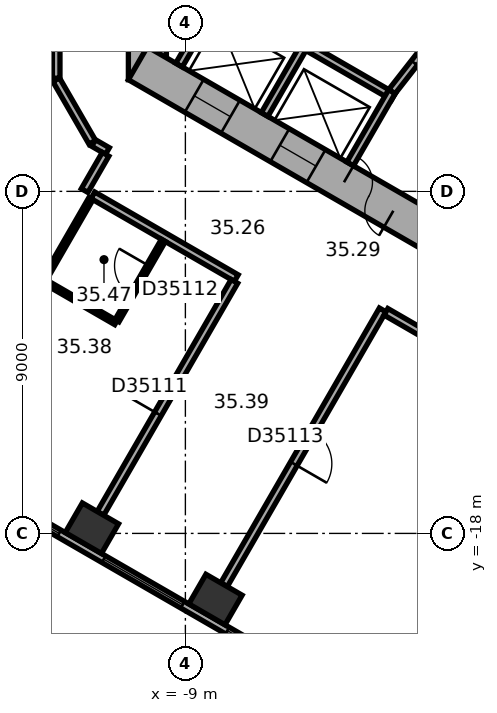
"""IFC4 building model, lengths in metres.
Left out: names, types, materials, properties, quantities, classifications, styles, units other than length and angle.
Written with IfcOpenShell. Run it as: python <this file> out.ifc"""

import sys

from ifc_helpers import new_model, si_unit, direction, frame, frame_2d, origin, origin_2d, place, context, subcontext, project, spatial, rectangle, extrude, element, fill, save


model = new_model("IFC4")
c1 = context("Model", 3, precision=1e-05, world=origin(), true_north=direction((0.0, 1.0)))
c2 = subcontext(c1, "Body", "Model", "MODEL_VIEW")
j1 = project(units=[si_unit("LENGTHUNIT", "METRE"), si_unit("PLANEANGLEUNIT", "RADIAN")], contexts=[c1])
p1 = place(None, origin())
s1 = spatial("IfcSite", under=j1, at=p1, CompositionType="ELEMENT")
p2 = place(p1, origin())
s2 = spatial("IfcBuilding", under=s1, at=p2, CompositionType="ELEMENT")
p3 = place(p2, frame((0.0, 0.0, 146.6)))
s3 = spatial("IfcBuildingStorey", under=s2, at=p3, CompositionType="ELEMENT", Elevation=146.6)
for number, where, z_axis, x_axis in (
    (1, (-11.46, -17.863, 0.0), (0.0, 0.0, 1.0), (0.866, -0.5, 0.0)),
    (2, (-8.208, -19.74, 0.0), (0.0, 0.0, 1.0), (0.866, -0.5, 0.0)),
):
    element("IfcColumn", number, at=place(p3, frame(where, z_axis=z_axis, x_axis=x_axis)), inside=s3, PredefinedType="COLUMN", context=c2, shape_type="SweptSolid", body=[
        extrude(rectangle(XDim=1.1, YDim=0.9, at=origin_2d()), origin(), (0.0, 0.0, 1.0), 3.7),
    ])
p4 = place(p3, frame((-10.0, 6.062, 0.0), z_axis=(0.0, 0.0, 1.0), x_axis=(0.0, -1.0, 0.0)))
e3 = element("IfcWall", 3, at=p4, inside=s3, PredefinedType="SHEAR", context=c2, shape_type="SweptSolid", body=[
    extrude(rectangle(XDim=12.125, YDim=1.0, at=frame_2d((6.062, 0.0))), origin(), (0.0, 0.0, 1.0), 3.7),
])
p5 = place(p4, frame((5.212, 0.0, 0.0)))
e4 = element("IfcOpeningElement", 4, at=p5, cuts=e3, PredefinedType="OPENING", context=c2, shape_type="SweptSolid", body=[
    extrude(rectangle(XDim=1.1, YDim=2.1, at=frame_2d((0.55, 1.05))), frame((0.0, 0.51, 0.0), z_axis=(0.0, -1.0, 0.0), x_axis=(1.0, 0.0, 0.0)), (0.0, 0.0, 1.0), 1.02),
])
p6 = place(p4, frame((7.812, 0.0, 0.0)))
e5 = element("IfcOpeningElement", 5, at=p6, cuts=e3, PredefinedType="OPENING", context=c2, shape_type="SweptSolid", body=[
    extrude(rectangle(XDim=1.1, YDim=2.1, at=frame_2d((0.55, 1.05))), frame((0.0, 0.51, 0.0), z_axis=(0.0, -1.0, 0.0), x_axis=(1.0, 0.0, 0.0)), (0.0, 0.0, 1.0), 1.02),
])
p7 = place(p3, frame((-10.25, -5.629, 0.0), z_axis=(0.0, 0.0, 1.0), x_axis=(0.866022616891, -0.50000482701, 0.0)))
e6 = element("IfcWall", 6, at=p7, inside=s3, PredefinedType="SHEAR", context=c2, shape_type="SweptSolid", body=[
    extrude(rectangle(XDim=12.125, YDim=1.0, at=frame_2d((6.062, 0.0))), origin(), (0.0, 0.0, 1.0), 3.7),
])
p8 = place(p7, frame((6.262, 0.0, 0.0)))
e7 = element("IfcOpeningElement", 7, at=p8, cuts=e6, PredefinedType="OPENING", context=c2, shape_type="SweptSolid", body=[
    extrude(rectangle(XDim=1.5, YDim=2.1, at=frame_2d((0.75, 1.05))), frame((0.0, 0.51, 0.0), z_axis=(0.0, -1.0, 0.0), x_axis=(1.0, 0.0, 0.0)), (0.0, 0.0, 1.0), 1.02),
])
p9 = place(p7, frame((1.712, 0.0, 0.0)))
e8 = element("IfcOpeningElement", 8, at=p9, cuts=e6, PredefinedType="OPENING", context=c2, shape_type="SweptSolid", body=[
    extrude(rectangle(XDim=1.1, YDim=2.1, at=frame_2d((0.55, 1.05))), frame((0.0, 0.51, 0.0), z_axis=(0.0, -1.0, 0.0), x_axis=(1.0, 0.0, 0.0)), (0.0, 0.0, 1.0), 1.02),
])
p10 = place(p7, frame((4.312, 0.0, 0.0)))
e9 = element("IfcOpeningElement", 9, at=p10, cuts=e6, PredefinedType="OPENING", context=c2, shape_type="SweptSolid", body=[
    extrude(rectangle(XDim=1.1, YDim=2.1, at=frame_2d((0.55, 1.05))), frame((0.0, 0.51, 0.0), z_axis=(0.0, -1.0, 0.0), x_axis=(1.0, 0.0, 0.0)), (0.0, 0.0, 1.0), 1.02),
])
p11 = place(p3, frame((-18.789, -14.267, 0.0), z_axis=(0.0, 0.0, 1.0), x_axis=(0.866023315909, -0.500003616288, 0.0)))
e10 = element("IfcWall", 10, at=p11, inside=s3, PredefinedType="STANDARD", context=c2, shape_type="SweptSolid", body=[
    extrude(rectangle(XDim=20.044, YDim=0.2, at=frame_2d((10.022, 0.0))), origin(), (0.0, 0.0, 1.0), 3.7),
])
p12 = place(p11, frame((1.314, 0.0, 0.9)))
e11 = element("IfcOpeningElement", 11, at=p12, cuts=e10, PredefinedType="OPENING", context=c2, shape_type="SweptSolid", body=[
    extrude(rectangle(XDim=2.4, YDim=2.0, at=frame_2d((1.2, 1.0))), frame((0.0, 0.11, 0.0), z_axis=(0.0, -1.0, 0.0), x_axis=(1.0, 0.0, 0.0)), (0.0, 0.0, 1.0), 0.22),
])
p13 = place(p11, frame((5.069, 0.0, 0.9)))
e12 = element("IfcOpeningElement", 12, at=p13, cuts=e10, PredefinedType="OPENING", context=c2, shape_type="SweptSolid", body=[
    extrude(rectangle(XDim=2.4, YDim=2.0, at=frame_2d((1.2, 1.0))), frame((0.0, 0.11, 0.0), z_axis=(0.0, -1.0, 0.0), x_axis=(1.0, 0.0, 0.0)), (0.0, 0.0, 1.0), 0.22),
])
p14 = place(p11, frame((8.823, 0.0, 0.9)))
e13 = element("IfcOpeningElement", 13, at=p14, cuts=e10, PredefinedType="OPENING", context=c2, shape_type="SweptSolid", body=[
    extrude(rectangle(XDim=2.4, YDim=2.0, at=frame_2d((1.2, 1.0))), frame((0.0, 0.11, 0.0), z_axis=(0.0, -1.0, 0.0), x_axis=(1.0, 0.0, 0.0)), (0.0, 0.0, 1.0), 0.22),
])
p15 = place(p11, frame((12.577, 0.0, 0.9)))
e14 = element("IfcOpeningElement", 14, at=p15, cuts=e10, PredefinedType="OPENING", context=c2, shape_type="SweptSolid", body=[
    extrude(rectangle(XDim=2.4, YDim=2.0, at=frame_2d((1.2, 1.0))), frame((0.0, 0.11, 0.0), z_axis=(0.0, -1.0, 0.0), x_axis=(1.0, 0.0, 0.0)), (0.0, 0.0, 1.0), 0.22),
])
p16 = place(p11, frame((16.331, 0.0, 0.9)))
e15 = element("IfcOpeningElement", 15, at=p16, cuts=e10, PredefinedType="OPENING", context=c2, shape_type="SweptSolid", body=[
    extrude(rectangle(XDim=2.4, YDim=2.0, at=frame_2d((1.2, 1.0))), frame((0.0, 0.11, 0.0), z_axis=(0.0, -1.0, 0.0), x_axis=(1.0, 0.0, 0.0)), (0.0, 0.0, 1.0), 0.22),
])
p17 = place(p3, frame((-8.203, -3.809, 0.0), z_axis=(0.0, 0.0, 1.0), x_axis=(0.866028230842, -0.499995103361, 0.0)))
e16 = element("IfcWall", 16, at=p17, inside=s3, PredefinedType="PARTITIONING", context=c2, shape_type="SweptSolid", body=[
    extrude(rectangle(XDim=5.4, YDim=0.2, at=frame_2d((2.7, 0.0))), origin(), (0.0, 0.0, 1.0), 3.42),
])
for number, where, z_axis, x_axis in (
    (17, (-8.067, -3.772, 0.0), (0.0, 0.0, 1.0), (-0.5, -0.866, 0.0)),
    (18, (-5.815, -5.072, 0.0), (0.0, 0.0, 1.0), (-0.5, -0.866, 0.0)),
):
    element("IfcWall", number, at=place(p3, frame(where, z_axis=z_axis, x_axis=x_axis)), inside=s3, PredefinedType="PARTITIONING", context=c2, shape_type="SweptSolid", body=[
        extrude(rectangle(XDim=2.2, YDim=0.2, at=frame_2d((1.1, 0.0))), origin(), (0.0, 0.0, 1.0), 3.42),
    ])
p18 = place(p3, frame((-3.563, -6.372, 0.0), z_axis=(0.0, 0.0, 1.0), x_axis=(-0.499994660107, -0.866028486751, 0.0)))
e19 = element("IfcWall", 19, at=p18, inside=s3, PredefinedType="PARTITIONING", context=c2, shape_type="SweptSolid", body=[
    extrude(rectangle(XDim=2.2, YDim=0.2, at=frame_2d((1.1, 0.0))), origin(), (0.0, 0.0, 1.0), 3.42),
])
p19 = place(p3, frame((-1.712, -4.008, 0.0), z_axis=(0.0, 0.0, 1.0), x_axis=(-0.616549420702, -0.787316208287, 0.0)))
e20 = element("IfcWall", 20, at=p19, inside=s3, PredefinedType="PARTITIONING", context=c2, shape_type="SweptSolid", body=[
    extrude(rectangle(XDim=3.002, YDim=0.2, at=frame_2d((1.501, 0.0))), origin(), (0.0, 0.0, 1.0), 3.42),
])
p20 = place(p19, frame((1.15, 0.0, 0.0)))
e21 = element("IfcOpeningElement", 21, at=p20, cuts=e20, PredefinedType="OPENING", context=c2, shape_type="SweptSolid", body=[
    extrude(rectangle(XDim=0.9, YDim=2.1, at=frame_2d((0.45, 1.05))), frame((0.0, 0.11, 0.0), z_axis=(0.0, -1.0, 0.0), x_axis=(1.0, 0.0, 0.0)), (0.0, 0.0, 1.0), 0.22),
])
p21 = place(p3, frame((-20.421, -6.005, 0.0), z_axis=(0.0, 0.0, 1.0), x_axis=(0.998134865741, 0.061047438866, 0.0)))
e22 = element("IfcWall", 22, at=p21, inside=s3, PredefinedType="PARTITIONING", context=c2, shape_type="SweptSolid", body=[
    extrude(rectangle(XDim=7.927, YDim=0.2, at=frame_2d((3.963, 0.0))), origin(), (0.0, 0.0, 1.0), 2.87),
])
p22 = place(p3, frame((-12.735, -11.355, 0.0), z_axis=(0.0, 0.0, 1.0), x_axis=(0.500004234368, 0.866022959057, 0.0)))
e23 = element("IfcWall", 23, at=p22, inside=s3, PredefinedType="PARTITIONING", context=c2, shape_type="SweptSolid", body=[
    extrude(rectangle(XDim=2.5, YDim=0.12, at=frame_2d((1.25, 0.0))), origin(), (0.0, 0.0, 1.0), 3.42),
])
p23 = place(p3, frame((-12.4, -6.062, 0.0), z_axis=(0.0, 0.0, 1.0), x_axis=(0.500022797313, -0.86601224135, 0.0)))
e24 = element("IfcWall", 24, at=p23, inside=s3, PredefinedType="PARTITIONING", context=c2, shape_type="SweptSolid", body=[
    extrude(rectangle(XDim=1.9, YDim=0.2, at=frame_2d((0.95, 0.0))), origin(), (0.0, 0.0, 1.0), 3.42),
])
p24 = place(p3, frame((-12.4, -4.201, 0.0), z_axis=(0.0, 0.0, 1.0), x_axis=(0.0, -1.0, 0.0)))
e25 = element("IfcWall", 25, at=p24, inside=s3, PredefinedType="PARTITIONING", context=c2, shape_type="SweptSolid", body=[
    extrude(rectangle(XDim=1.821, YDim=0.2, at=frame_2d((0.911, 0.0))), origin(), (0.0, 0.0, 1.0), 3.42),
])
p25 = place(p3, frame((-11.435, -9.103, 0.0), z_axis=(0.0, 0.0, 1.0), x_axis=(0.866007399799, -0.500031182522, 0.0)))
e26 = element("IfcWall", 26, at=p25, inside=s3, PredefinedType="PARTITIONING", context=c2, shape_type="SweptSolid", body=[
    extrude(rectangle(XDim=4.358, YDim=0.2, at=frame_2d((2.179, 0.0))), origin(), (0.0, 0.0, 1.0), 3.42),
])
p26 = place(p3, frame((-11.415, -7.728, 0.0), z_axis=(0.0, 0.0, 1.0), x_axis=(0.865915281873, -0.500190688257, 0.0)))
e27 = element("IfcWall", 27, at=p26, inside=s3, PredefinedType="PARTITIONING", context=c2, shape_type="SweptSolid", body=[
    extrude(rectangle(XDim=0.421, YDim=0.2, at=frame_2d((0.21, 0.0))), origin(), (0.0, 0.0, 1.0), 3.42),
])
p27 = place(p3, frame((-11.235, -17.474, 0.0), z_axis=(0.0, 0.0, 1.0), x_axis=(0.500009260695, 0.866020057054, 0.0)))
e28 = element("IfcWall", 28, at=p27, inside=s3, PredefinedType="PARTITIONING", context=c2, shape_type="SweptSolid", body=[
    extrude(rectangle(XDim=7.049, YDim=0.2, at=frame_2d((3.524, 0.0))), origin(), (0.0, 0.0, 1.0), 2.87),
])
p28 = place(p27, frame((3.024, 0.0, 0.0)))
e29 = element("IfcOpeningElement", 29, at=p28, cuts=e28, PredefinedType="OPENING", context=c2, shape_type="SweptSolid", body=[
    extrude(rectangle(XDim=1.0, YDim=2.1, at=frame_2d((0.5, 1.05))), frame((0.0, 0.11, 0.0), z_axis=(0.0, -1.0, 0.0), x_axis=(1.0, 0.0, 0.0)), (0.0, 0.0, 1.0), 0.22),
])
p29 = place(p3, frame((-11.101, -8.025, 0.0), z_axis=(0.0, 0.0, 1.0), x_axis=(-0.500074377092, -0.865982457891, 0.0)))
e30 = element("IfcWall", 30, at=p29, inside=s3, PredefinedType="PARTITIONING", context=c2, shape_type="SweptSolid", body=[
    extrude(rectangle(XDim=1.101, YDim=0.2, at=frame_2d((0.55, 0.0))), origin(), (0.0, 0.0, 1.0), 3.42),
])
p30 = place(p3, frame((-10.829, -12.455, 0.0), z_axis=(0.0, 0.0, 1.0), x_axis=(-0.86600889856, 0.500028586798, 0.0)))
e31 = element("IfcWall", 31, at=p30, inside=s3, PredefinedType="PARTITIONING", context=c2, shape_type="SweptSolid", body=[
    extrude(rectangle(XDim=2.14, YDim=0.12, at=frame_2d((1.07, 0.0))), origin(), (0.0, 0.0, 1.0), 3.42),
])
p31 = place(p3, frame((-9.579, -10.29, 0.0), z_axis=(0.0, 0.0, 1.0), x_axis=(-0.499959183527, -0.866048967903, 0.0)))
e32 = element("IfcWall", 32, at=p31, inside=s3, PredefinedType="PARTITIONING", context=c2, shape_type="SweptSolid", body=[
    extrude(rectangle(XDim=2.44, YDim=0.12, at=frame_2d((1.22, 0.0))), origin(), (0.0, 0.0, 1.0), 3.42),
])
p32 = place(p31, frame((0.77, 0.0, 0.0)))
e33 = element("IfcOpeningElement", 33, at=p32, cuts=e32, PredefinedType="OPENING", context=c2, shape_type="SweptSolid", body=[
    extrude(rectangle(XDim=0.9, YDim=2.1, at=frame_2d((0.45, 1.05))), frame((0.0, 0.07, 0.0), z_axis=(0.0, -1.0, 0.0), x_axis=(1.0, 0.0, 0.0)), (0.0, 0.0, 1.0), 0.14),
])
p33 = place(p3, frame((-7.984, -19.351, 0.0), z_axis=(0.0, 0.0, 1.0), x_axis=(0.500010139422, 0.866019549707, 0.0)))
e34 = element("IfcWall", 34, at=p33, inside=s3, PredefinedType="PARTITIONING", context=c2, shape_type="SweptSolid", body=[
    extrude(rectangle(XDim=8.35, YDim=0.2, at=frame_2d((4.175, 0.0))), origin(), (0.0, 0.0, 1.0), 3.42),
])
p34 = place(p33, frame((3.675, 0.0, 0.0)))
e35 = element("IfcOpeningElement", 35, at=p34, cuts=e34, PredefinedType="OPENING", context=c2, shape_type="SweptSolid", body=[
    extrude(rectangle(XDim=1.0, YDim=2.1, at=frame_2d((0.5, 1.05))), frame((0.0, 0.11, 0.0), z_axis=(0.0, -1.0, 0.0), x_axis=(1.0, 0.0, 0.0)), (0.0, 0.0, 1.0), 0.22),
])
p35 = place(p3, frame((-3.722, -12.169, 0.0), z_axis=(0.0, 0.0, 1.0), x_axis=(0.866033163891, -0.499986558861, 0.0)))
e36 = element("IfcWall", 36, at=p35, inside=s3, PredefinedType="PARTITIONING", context=c2, shape_type="SweptSolid", body=[
    extrude(rectangle(XDim=3.201, YDim=0.2, at=frame_2d((1.6, 0.0))), origin(), (0.0, 0.0, 1.0), 3.42),
])
p36 = place(p13, origin())
e37 = element("IfcWindow", 37, at=p36, inside=s3, PartitioningType="SINGLE_PANEL", PredefinedType="WINDOW", context=c2, shape_type="SweptSolid", body=[
    extrude(rectangle(XDim=2.4, YDim=2.0, at=frame_2d((1.2, 1.0))), frame((0.0, 0.03, 0.0), z_axis=(0.0, -1.0, 0.0), x_axis=(1.0, 0.0, 0.0)), (0.0, 0.0, 1.0), 0.06),
])
fill(e12, e37)
p37 = place(p14, origin())
e38 = element("IfcWindow", 38, at=p37, inside=s3, PartitioningType="SINGLE_PANEL", PredefinedType="WINDOW", context=c2, shape_type="SweptSolid", body=[
    extrude(rectangle(XDim=2.4, YDim=2.0, at=frame_2d((1.2, 1.0))), frame((0.0, 0.03, 0.0), z_axis=(0.0, -1.0, 0.0), x_axis=(1.0, 0.0, 0.0)), (0.0, 0.0, 1.0), 0.06),
])
fill(e13, e38)
p38 = place(p15, origin())
e39 = element("IfcWindow", 39, at=p38, inside=s3, PartitioningType="SINGLE_PANEL", PredefinedType="WINDOW", context=c2, shape_type="SweptSolid", body=[
    extrude(rectangle(XDim=2.4, YDim=2.0, at=frame_2d((1.2, 1.0))), frame((0.0, 0.03, 0.0), z_axis=(0.0, -1.0, 0.0), x_axis=(1.0, 0.0, 0.0)), (0.0, 0.0, 1.0), 0.06),
])
fill(e14, e39)
p39 = place(p8, origin())
e40 = element("IfcDoor", 40, at=p39, inside=s3, OperationType="DOUBLE_DOOR_SINGLE_SWING", PredefinedType="DOOR", context=c2, shape_type="SweptSolid", body=[
    extrude(rectangle(XDim=1.5, YDim=2.1, at=frame_2d((0.75, 1.05))), frame((0.0, 0.025, 0.0), z_axis=(0.0, -1.0, 0.0), x_axis=(1.0, 0.0, 0.0)), (0.0, 0.0, 1.0), 0.05),
])
fill(e7, e40)
p40 = place(p20, origin())
e41 = element("IfcDoor", 41, at=p40, inside=s3, OperationType="SINGLE_SWING_LEFT", PredefinedType="DOOR", context=c2, shape_type="SweptSolid", body=[
    extrude(rectangle(XDim=0.9, YDim=2.1, at=frame_2d((0.45, 1.05))), frame((0.0, 0.025, 0.0), z_axis=(0.0, -1.0, 0.0), x_axis=(1.0, 0.0, 0.0)), (0.0, 0.0, 1.0), 0.05),
])
fill(e21, e41)
p41 = place(p9, origin())
e42 = element("IfcDoor", 42, at=p41, inside=s3, OperationType="DOUBLE_DOOR_SLIDING", PredefinedType="DOOR", context=c2, shape_type="SweptSolid", body=[
    extrude(rectangle(XDim=1.1, YDim=2.1, at=frame_2d((0.55, 1.05))), frame((0.0, 0.025, 0.0), z_axis=(0.0, -1.0, 0.0), x_axis=(1.0, 0.0, 0.0)), (0.0, 0.0, 1.0), 0.05),
])
fill(e8, e42)
p42 = place(p10, origin())
e43 = element("IfcDoor", 43, at=p42, inside=s3, OperationType="DOUBLE_DOOR_SLIDING", PredefinedType="DOOR", context=c2, shape_type="SweptSolid", body=[
    extrude(rectangle(XDim=1.1, YDim=2.1, at=frame_2d((0.55, 1.05))), frame((0.0, 0.025, 0.0), z_axis=(0.0, -1.0, 0.0), x_axis=(1.0, 0.0, 0.0)), (0.0, 0.0, 1.0), 0.05),
])
fill(e9, e43)
p43 = place(p28, origin())
e44 = element("IfcDoor", 44, at=p43, inside=s3, OperationType="SINGLE_SWING_LEFT", PredefinedType="DOOR", context=c2, shape_type="SweptSolid", body=[
    extrude(rectangle(XDim=1.0, YDim=2.1, at=frame_2d((0.5, 1.05))), frame((0.0, 0.025, 0.0), z_axis=(0.0, -1.0, 0.0), x_axis=(1.0, 0.0, 0.0)), (0.0, 0.0, 1.0), 0.05),
])
fill(e29, e44)
p44 = place(p32, origin())
e45 = element("IfcDoor", 45, at=p44, inside=s3, OperationType="SINGLE_SWING_LEFT", PredefinedType="DOOR", context=c2, shape_type="SweptSolid", body=[
    extrude(rectangle(XDim=0.9, YDim=2.1, at=frame_2d((0.45, 1.05))), frame((0.0, 0.025, 0.0), z_axis=(0.0, -1.0, 0.0), x_axis=(1.0, 0.0, 0.0)), (0.0, 0.0, 1.0), 0.05),
])
fill(e33, e45)
p45 = place(p34, origin())
e46 = element("IfcDoor", 46, at=p45, inside=s3, OperationType="SINGLE_SWING_LEFT", PredefinedType="DOOR", context=c2, shape_type="SweptSolid", body=[
    extrude(rectangle(XDim=1.0, YDim=2.1, at=frame_2d((0.5, 1.05))), frame((0.0, 0.025, 0.0), z_axis=(0.0, -1.0, 0.0), x_axis=(1.0, 0.0, 0.0)), (0.0, 0.0, 1.0), 0.05),
])
fill(e35, e46)
save(model, sys.argv[1])
